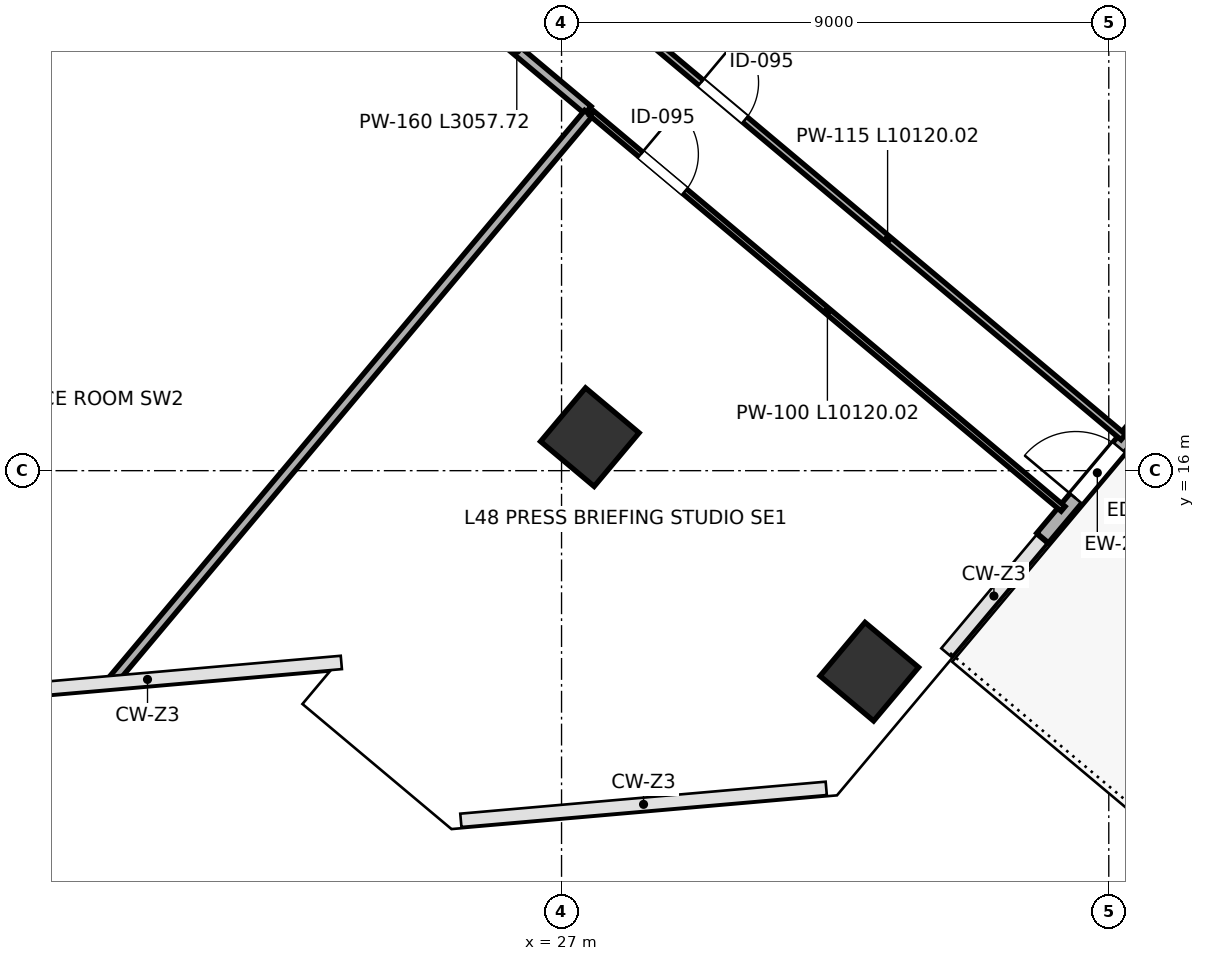
"""IFC4 building model, lengths in metres.
Left out: names, types, materials, properties, quantities, classifications, styles, units other than length and angle.
Written with IfcOpenShell. Run it as: python <this file> out.ifc"""

import sys

from ifc_helpers import new_model, si_unit, direction, frame, frame_2d, origin, origin_2d, place, context, subcontext, project, spatial, rectangle, extrude, source, transform, mapped, element, fill, save


model = new_model("IFC4")
c1 = context("Model", 3, precision=1e-05, world=origin(), true_north=direction((0.0, 1.0)))
c2 = subcontext(c1, "Body", "Model", "MODEL_VIEW")
j1 = project(units=[si_unit("LENGTHUNIT", "METRE"), si_unit("PLANEANGLEUNIT", "RADIAN")], contexts=[c1])
p1 = place(None, origin())
s1 = spatial("IfcSite", under=j1, at=p1, CompositionType="ELEMENT")
p2 = place(p1, origin())
s2 = spatial("IfcBuilding", under=s1, at=p2, CompositionType="ELEMENT")
p3 = place(p2, frame((0.0, 0.0, 215.2)))
s3 = spatial("IfcBuildingStorey", under=s2, at=p3, CompositionType="ELEMENT", Elevation=215.2)
m1 = source(origin(), c2, "Body", "SweptSolid", [
    extrude(rectangle(XDim=1.15, YDim=1.15, at=origin_2d()), origin(), (0.0, 0.0, 1.0), 5.399),
])
p4 = place(p3, frame((27.465, 16.551, 0.001), z_axis=(0.0, 0.0, 1.0), x_axis=(-0.766044443119, 0.642787609687, 0.0)))
e1 = element("IfcColumn", 1, at=p4, inside=s3, PredefinedType="COLUMN", context=c2, shape_type="MappedRepresentation", body=[
    mapped(m1, transform((0.0, 0.0, 0.0), scale=1.0)),
])
m2 = source(origin(), c2, "Body", "SweptSolid", [
    extrude(rectangle(XDim=1.15, YDim=1.15, at=origin_2d()), origin(), (0.0, 0.0, 1.0), 5.399),
])
p5 = place(p3, frame((32.062, 12.695, 0.001), z_axis=(0.0, 0.0, 1.0), x_axis=(-0.766044443119, 0.642787609687, 0.0)))
e2 = element("IfcColumn", 2, at=p5, inside=s3, PredefinedType="COLUMN", context=c2, shape_type="MappedRepresentation", body=[
    mapped(m2, transform((0.0, 0.0, 0.0), scale=1.0)),
])
p6 = place(p3, frame((34.911, 14.893, 0.0), z_axis=(0.0, 0.0, 1.0), x_axis=(0.642770757628, 0.766058583359, 0.0)))
e3 = element("IfcWall", 3, at=p6, inside=s3, PredefinedType="SOLIDWALL", context=c2, shape_type="SweptSolid", body=[
    extrude(rectangle(XDim=2.8, YDim=0.25, at=frame_2d((1.4, 0.0))), origin(), (0.0, 0.0, 1.0), 5.16),
])
p7 = place(p6, frame((0.85, 0.0, 0.0)))
e4 = element("IfcOpeningElement", 4, at=p7, cuts=e3, PredefinedType="OPENING", context=c2, shape_type="SweptSolid", body=[
    extrude(rectangle(XDim=1.1, YDim=2.2, at=frame_2d((0.55, 1.1))), frame((0.0, 0.135, 0.0), z_axis=(0.0, -1.0, 0.0), x_axis=(1.0, 0.0, 0.0)), (0.0, 0.0, 1.0), 0.27),
])
p8 = place(p3, frame((25.093, 23.894, 0.0), z_axis=(0.0, 0.0, 1.0), x_axis=(0.76609008417, -0.642733212878, 0.0)))
e5 = element("IfcWall", 5, at=p8, inside=s3, PredefinedType="PARTITIONING", context=c2, shape_type="SweptSolid", body=[
    extrude(rectangle(XDim=3.058, YDim=0.16, at=frame_2d((1.529, 0.0))), origin(), (0.0, 0.0, 1.0), 5.16),
])
p9 = place(p3, frame((19.622, 12.556, 0.0), z_axis=(0.0, 0.0, 1.0), x_axis=(0.642789011194, 0.766043267112, 0.0)))
e6 = element("IfcWall", 6, at=p9, inside=s3, PredefinedType="PARTITIONING", context=c2, shape_type="SweptSolid", body=[
    extrude(rectangle(XDim=12.162, YDim=0.16, at=frame_2d((6.081, 0.0))), origin(), (0.0, 0.0, 1.0), 5.16),
])
p10 = place(p3, frame((28.486, 23.057, 0.0), z_axis=(0.0, 0.0, 1.0), x_axis=(0.766053586218, -0.642776713208, 0.0)))
e7 = element("IfcWall", 7, at=p10, inside=s3, PredefinedType="PARTITIONING", context=c2, shape_type="SweptSolid", body=[
    extrude(rectangle(XDim=10.12, YDim=0.115, at=frame_2d((5.06, 0.0))), origin(), (0.0, 0.0, 1.0), 5.16),
])
p11 = place(p10, frame((1.05, 0.0, 0.0)))
e8 = element("IfcOpeningElement", 8, at=p11, cuts=e7, PredefinedType="OPENING", context=c2, shape_type="SweptSolid", body=[
    extrude(rectangle(XDim=0.95, YDim=2.15, at=frame_2d((0.475, 1.075))), frame((0.0, 0.067, 0.0), z_axis=(0.0, -1.0, 0.0), x_axis=(1.0, 0.0, 0.0)), (0.0, 0.0, 1.0), 0.135),
])
p12 = place(p3, frame((27.496, 21.877, 0.0), z_axis=(0.0, 0.0, 1.0), x_axis=(0.766053586218, -0.642776713208, 0.0)))
e9 = element("IfcWall", 9, at=p12, inside=s3, PredefinedType="PARTITIONING", context=c2, shape_type="SweptSolid", body=[
    extrude(rectangle(XDim=10.12, YDim=0.1, at=frame_2d((5.06, 0.0))), origin(), (0.0, 0.0, 1.0), 5.16),
])
p13 = place(p12, frame((1.05, 0.0, 0.0)))
e10 = element("IfcOpeningElement", 10, at=p13, cuts=e9, PredefinedType="OPENING", context=c2, shape_type="SweptSolid", body=[
    extrude(rectangle(XDim=0.95, YDim=2.15, at=frame_2d((0.475, 1.075))), frame((0.0, 0.06, 0.0), z_axis=(0.0, -1.0, 0.0), x_axis=(1.0, 0.0, 0.0)), (0.0, 0.0, 1.0), 0.12),
])
m3 = source(origin(), c2, "Body", "SweptSolid", [
    extrude(rectangle(XDim=1.1, YDim=2.2, at=frame_2d((0.55, 1.1))), frame((0.0, 0.025, 0.0), z_axis=(0.0, -1.0, 0.0), x_axis=(1.0, 0.0, 0.0)), (0.0, 0.0, 1.0), 0.05),
])
p14 = place(p7, origin())
e11 = element("IfcDoor", 11, at=p14, inside=s3, OperationType="SINGLE_SWING_LEFT", PredefinedType="DOOR", context=c2, shape_type="MappedRepresentation", body=[
    mapped(m3, transform((0.0, 0.0, 0.0), scale=1.0)),
])
fill(e4, e11)
m4 = source(origin(), c2, "Body", "SweptSolid", [
    extrude(rectangle(XDim=0.95, YDim=2.15, at=frame_2d((0.475, 1.075))), frame((0.0, 0.025, 0.0), z_axis=(0.0, -1.0, 0.0), x_axis=(1.0, 0.0, 0.0)), (0.0, 0.0, 1.0), 0.05),
])
p15 = place(p11, origin())
e12 = element("IfcDoor", 12, at=p15, inside=s3, OperationType="SINGLE_SWING_LEFT", PredefinedType="DOOR", context=c2, shape_type="MappedRepresentation", body=[
    mapped(m4, transform((0.0, 0.0, 0.0), scale=1.0)),
])
fill(e8, e12)
p16 = place(p13, origin())
e13 = element("IfcDoor", 13, at=p16, inside=s3, OperationType="SINGLE_SWING_LEFT", PredefinedType="DOOR", context=c2, shape_type="MappedRepresentation", body=[
    mapped(m4, transform((0.0, 0.0, 0.0), scale=1.0)),
])
fill(e10, e13)
save(model, sys.argv[1])
